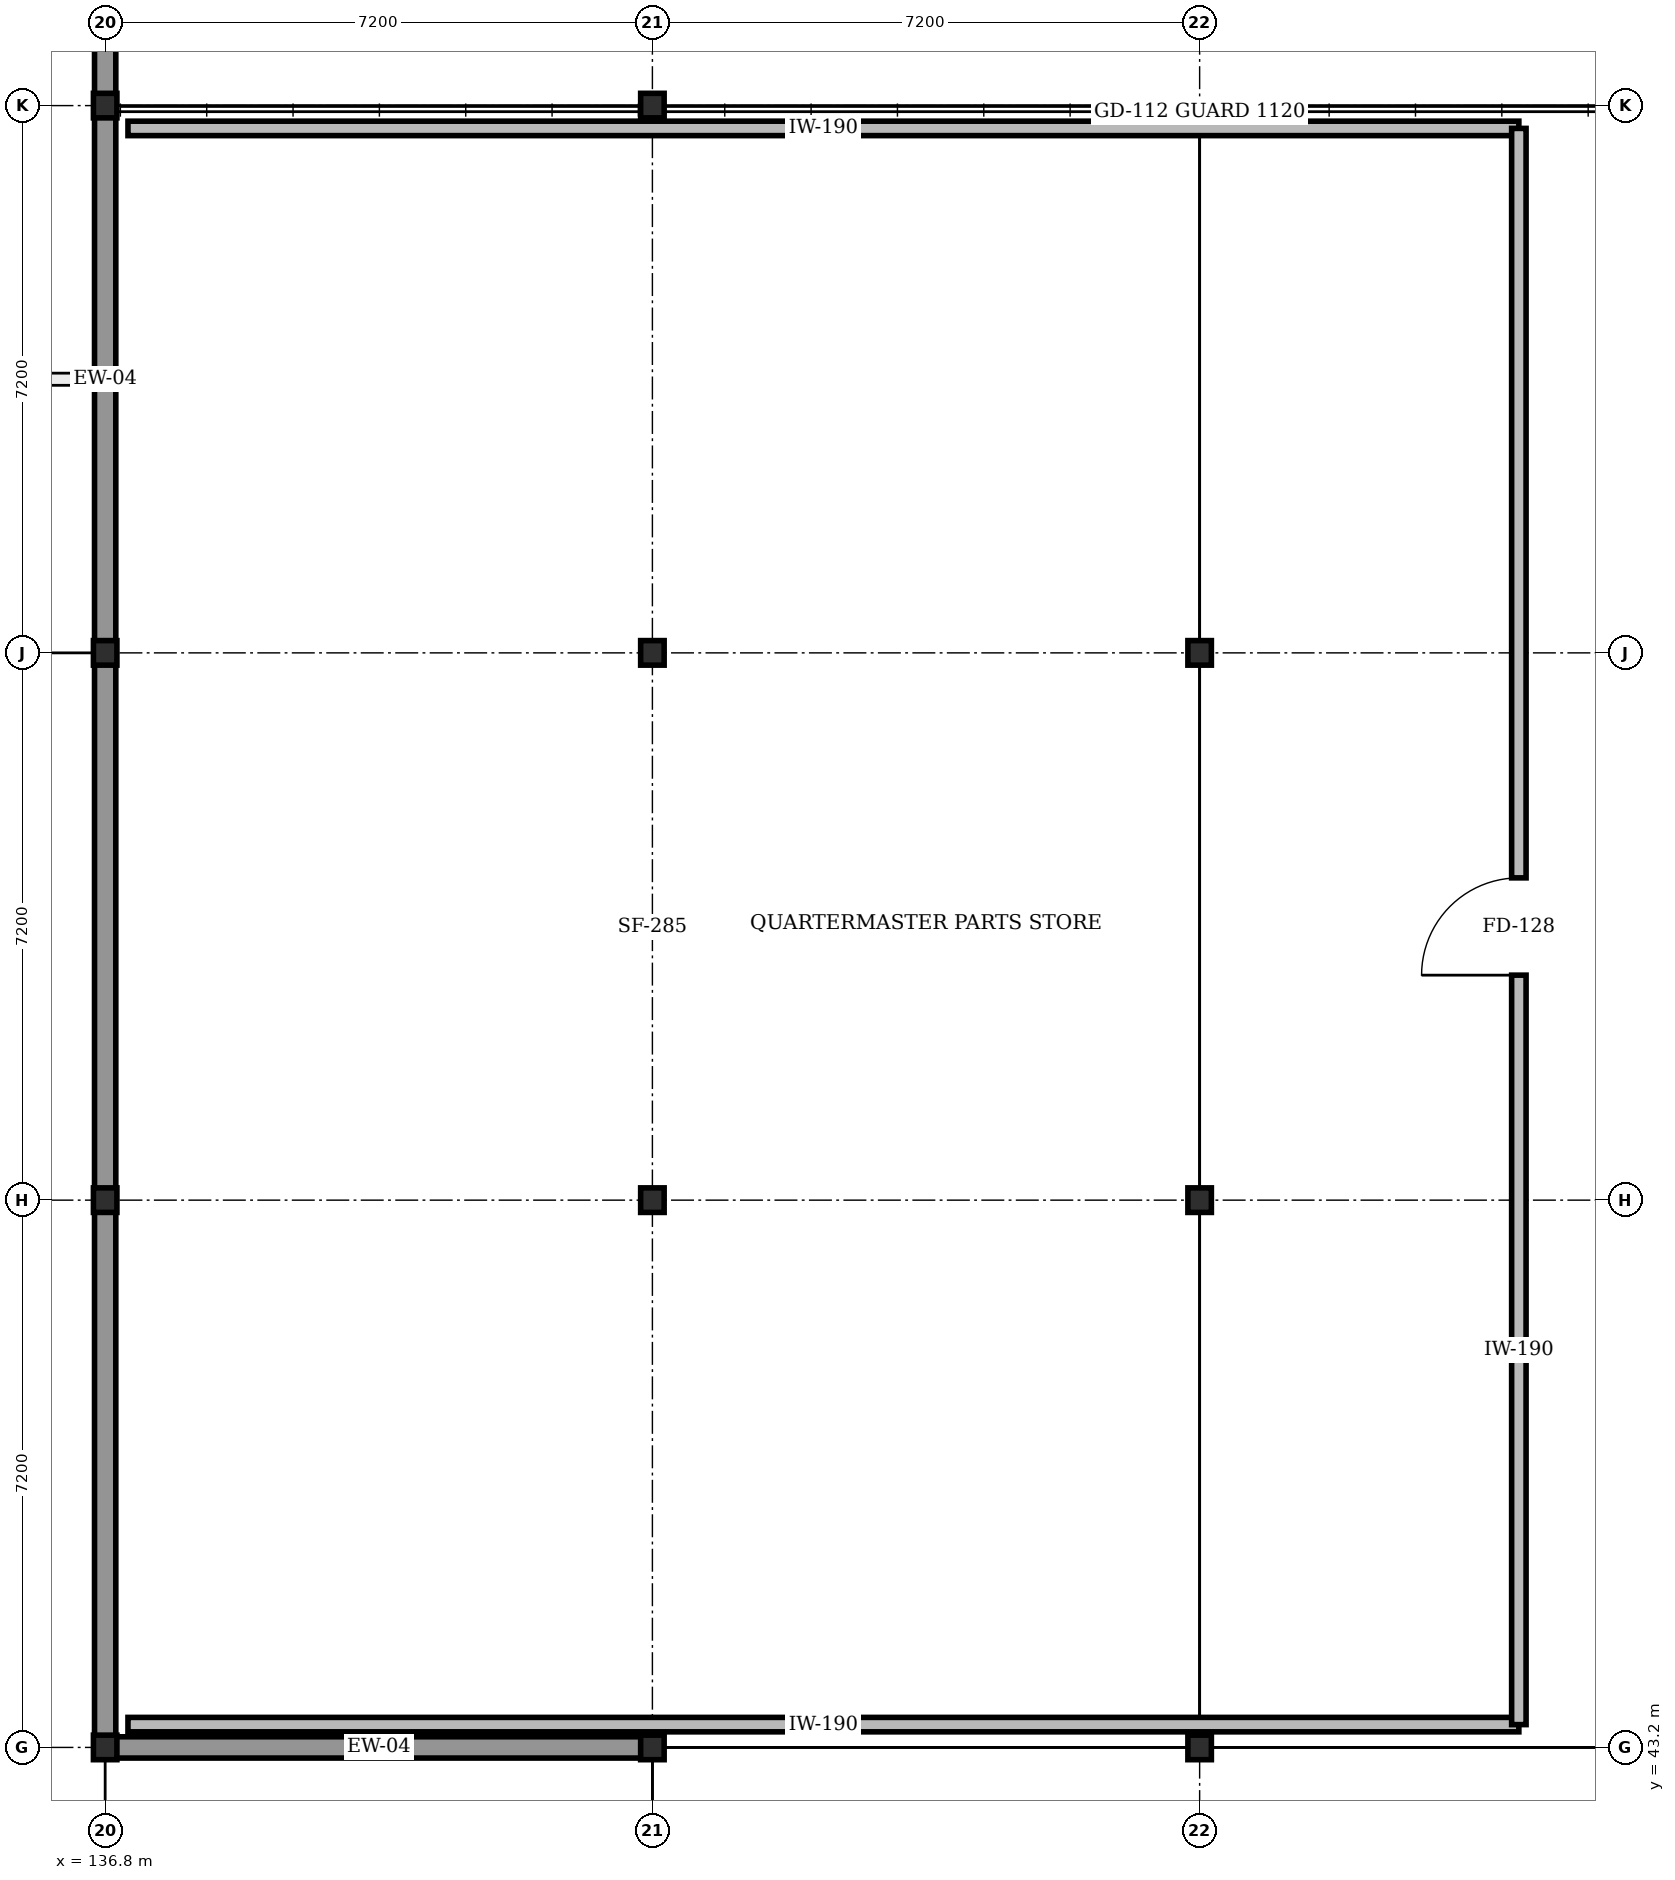
"""IFC4 building model, lengths in metres.
Left out: names, types, materials, properties, quantities, classifications, styles, units other than length and angle.
Written with IfcOpenShell. Run it as: python <this file> out.ifc"""

import sys

from ifc_helpers import new_model, si_unit, direction, frame, frame_2d, origin, origin_2d, place, context, subcontext, project, spatial, rectangle, i_section, extrude, element, fill, save


model = new_model("IFC4")
c1 = context("Model", 3, precision=1e-05, world=origin(), true_north=direction((0.0, 1.0)))
c2 = subcontext(c1, "Body", "Model", "MODEL_VIEW")
j1 = project(units=[si_unit("LENGTHUNIT", "METRE"), si_unit("PLANEANGLEUNIT", "RADIAN")], contexts=[c1])
p1 = place(None, origin())
s1 = spatial("IfcSite", under=j1, at=p1, CompositionType="ELEMENT")
p2 = place(p1, origin())
s2 = spatial("IfcBuilding", under=s1, at=p2, CompositionType="ELEMENT")
p3 = place(p2, frame((0.0, 0.0, 6.0)))
s3 = spatial("IfcBuildingStorey", under=s2, at=p3, CompositionType="ELEMENT", Elevation=6.0)
for number, where, z_axis, x_axis in (
    (1, (136.8, 43.2, 0.0), (0.0, 0.0, 1.0), (1.0, 0.0, 0.0)),
    (2, (136.8, 50.4, 0.0), (0.0, 0.0, 1.0), (1.0, 0.0, 0.0)),
    (3, (136.8, 57.6, 0.0), (0.0, 0.0, 1.0), (1.0, 0.0, 0.0)),
    (4, (136.8, 64.8, 0.0), (0.0, 0.0, 1.0), (1.0, 0.0, 0.0)),
    (5, (144.0, 43.2, 0.0), (0.0, 0.0, 1.0), (1.0, 0.0, 0.0)),
    (6, (144.0, 50.4, 0.0), (0.0, 0.0, 1.0), (1.0, 0.0, 0.0)),
    (7, (144.0, 57.6, 0.0), (0.0, 0.0, 1.0), (1.0, 0.0, 0.0)),
    (8, (144.0, 64.8, 0.0), (0.0, 0.0, 1.0), (1.0, 0.0, 0.0)),
    (9, (151.2, 43.2, 0.0), (0.0, 0.0, 1.0), (1.0, 0.0, 0.0)),
    (10, (151.2, 50.4, 0.0), (0.0, 0.0, 1.0), (1.0, 0.0, 0.0)),
    (11, (151.2, 57.6, 0.0), (0.0, 0.0, 1.0), (1.0, 0.0, 0.0)),
):
    element("IfcColumn", number, at=place(p3, frame(where, z_axis=z_axis, x_axis=x_axis)), inside=s3, PredefinedType="COLUMN", context=c2, shape_type="SweptSolid", body=[
        extrude(i_section(OverallWidth=0.309, OverallDepth=0.323, WebThickness=0.014, FlangeThickness=0.023, at=origin_2d()), origin(), (0.0, 0.0, 1.0), 4.2),
    ])
p4 = place(p3, frame((136.8, 93.6, 0.0), z_axis=(0.0, 0.0, 1.0), x_axis=(0.0, -1.0, 0.0)))
e12 = element("IfcWall", 12, at=p4, inside=s3, PredefinedType="STANDARD", context=c2, shape_type="SweptSolid", body=[
    extrude(rectangle(XDim=50.4, YDim=0.28, at=frame_2d((25.2, 0.0))), origin(), (0.0, 0.0, 1.0), 3.247),
])
p5 = place(p3, frame((136.8, 43.2, 0.0), z_axis=(0.0, 0.0, 1.0), x_axis=(1.0, 0.0, 0.0)))
e13 = element("IfcWall", 13, at=p5, inside=s3, PredefinedType="STANDARD", context=c2, shape_type="SweptSolid", body=[
    extrude(rectangle(XDim=7.2, YDim=0.28, at=frame_2d((3.6, 0.0))), origin(), (0.0, 0.0, 1.0), 3.327),
])
for number, where, z_axis, x_axis in (
    (14, (137.1, 43.5, 0.0), (0.0, 0.0, 1.0), (1.0, 0.0, 0.0)),
    (15, (155.4, 64.5, 0.0), (0.0, 0.0, 1.0), (-1.0, 0.0, 0.0)),
):
    element("IfcWall", number, at=place(p3, frame(where, z_axis=z_axis, x_axis=x_axis)), inside=s3, PredefinedType="STANDARD", context=c2, shape_type="SweptSolid", body=[
        extrude(rectangle(XDim=18.3, YDim=0.19, at=frame_2d((9.15, 0.0))), origin(), (0.0, 0.0, 1.0), 3.408),
    ])
p6 = place(p3, frame((155.4, 43.5, 0.0), z_axis=(0.0, 0.0, 1.0), x_axis=(0.0, 1.0, 0.0)))
e16 = element("IfcWall", 16, at=p6, inside=s3, PredefinedType="STANDARD", context=c2, shape_type="SweptSolid", body=[
    extrude(rectangle(XDim=21.0, YDim=0.19, at=frame_2d((10.5, 0.0))), origin(), (0.0, 0.0, 1.0), 3.327),
])
p7 = place(p6, frame((9.86, 0.0, 0.0)))
e17 = element("IfcOpeningElement", 17, at=p7, cuts=e16, PredefinedType="OPENING", context=c2, shape_type="SweptSolid", body=[
    extrude(rectangle(XDim=1.28, YDim=2.22, at=frame_2d((0.64, 1.11))), frame((0.0, 0.105, 0.0), z_axis=(0.0, -1.0, 0.0), x_axis=(1.0, 0.0, 0.0)), (0.0, 0.0, 1.0), 0.21),
])
p8 = place(p7, origin())
e18 = element("IfcDoor", 18, at=p8, inside=s3, OperationType="SINGLE_SWING_LEFT", PredefinedType="DOOR", context=c2, shape_type="SweptSolid", body=[
    extrude(rectangle(XDim=1.28, YDim=2.22, at=frame_2d((0.64, 1.11))), frame((0.0, 0.025, 0.0), z_axis=(0.0, -1.0, 0.0), x_axis=(1.0, 0.0, 0.0)), (0.0, 0.0, 1.0), 0.05),
])
fill(e17, e18)
save(model, sys.argv[1])
